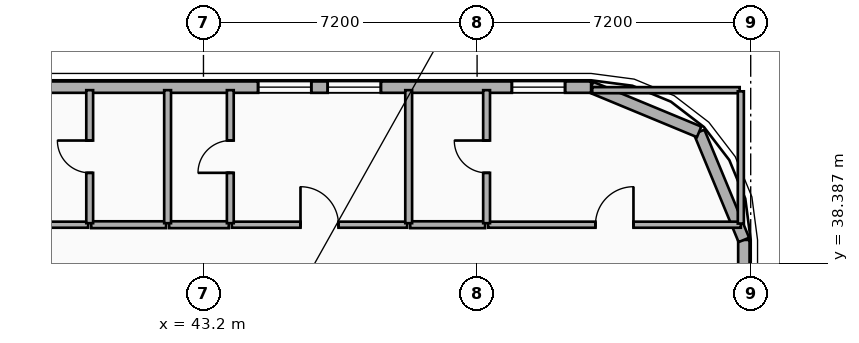
"""IFC4 building model, lengths in metres.
Left out: names, types, materials, properties, quantities, classifications, styles, units other than length and angle.
Written with IfcOpenShell. Run it as: python <this file> out.ifc"""

import sys

from ifc_helpers import new_model, si_unit, direction, frame, frame_2d, origin, place, context, subcontext, project, spatial, rectangle, extrude, element, fill, save


model = new_model("IFC4")
c1 = context("Model", 3, precision=1e-05, world=origin(), true_north=direction((0.0, 1.0)))
c2 = subcontext(c1, "Body", "Model", "MODEL_VIEW")
j1 = project(units=[si_unit("LENGTHUNIT", "METRE"), si_unit("PLANEANGLEUNIT", "RADIAN")], contexts=[c1])
p1 = place(None, origin())
s1 = spatial("IfcSite", under=j1, at=p1, CompositionType="ELEMENT")
p2 = place(p1, origin())
s2 = spatial("IfcBuilding", under=s1, at=p2, CompositionType="ELEMENT")
p3 = place(p2, frame((0.0, 0.0, 97.8)))
s3 = spatial("IfcBuildingStorey", under=s2, at=p3, CompositionType="ELEMENT", Elevation=97.8)
p4 = place(p3, frame((57.42, 39.0, 0.0), z_axis=(0.0, 0.0, 1.0), x_axis=(0.0, -1.0, 0.0)))
e1 = element("IfcWall", 1, at=p4, inside=s3, PredefinedType="SOLIDWALL", context=c2, shape_type="SweptSolid", body=[
    extrude(rectangle(XDim=18.0, YDim=0.3, at=frame_2d((9.0, 0.0))), origin(), (0.0, 0.0, 1.0), 3.24),
])
p5 = place(p4, frame((8.882, 0.0, 0.48)))
e2 = element("IfcOpeningElement", 2, at=p5, cuts=e1, PredefinedType="OPENING", context=c2, shape_type="SweptSolid", body=[
    extrude(rectangle(XDim=1.4, YDim=1.8, at=frame_2d((0.7, 0.9))), frame((0.0, 0.16, 0.0), z_axis=(0.0, -1.0, 0.0), x_axis=(1.0, 0.0, 0.0)), (0.0, 0.0, 1.0), 0.32),
])
p6 = place(p4, frame((3.621, 0.0, 0.48)))
e3 = element("IfcOpeningElement", 3, at=p6, cuts=e1, PredefinedType="OPENING", context=c2, shape_type="SweptSolid", body=[
    extrude(rectangle(XDim=1.4, YDim=1.8, at=frame_2d((0.7, 0.9))), frame((0.0, 0.16, 0.0), z_axis=(0.0, -1.0, 0.0), x_axis=(1.0, 0.0, 0.0)), (0.0, 0.0, 1.0), 0.32),
])
p7 = place(p4, frame((16.28, 0.0, 0.65)))
e4 = element("IfcOpeningElement", 4, at=p7, cuts=e1, PredefinedType="OPENING", context=c2, shape_type="SweptSolid", body=[
    extrude(rectangle(XDim=1.4, YDim=1.8, at=frame_2d((0.7, 0.9))), frame((0.0, 0.16, 0.0), z_axis=(0.0, -1.0, 0.0), x_axis=(1.0, 0.0, 0.0)), (0.0, 0.0, 1.0), 0.32),
])
p8 = place(p3, frame((56.243, 41.843, 0.0), z_axis=(0.0, 0.0, 1.0), x_axis=(0.382636798336, -0.92389884758, 0.0)))
e5 = element("IfcWall", 5, at=p8, inside=s3, PredefinedType="SOLIDWALL", context=c2, shape_type="SweptSolid", body=[
    extrude(rectangle(XDim=3.077, YDim=0.3, at=frame_2d((1.538, 0.0))), origin(), (0.0, 0.0, 1.0), 3.24),
])
p9 = place(p3, frame((53.4, 43.02, 0.0), z_axis=(0.0, 0.0, 1.0), x_axis=(0.923882414032, -0.382676475685, 0.0)))
e6 = element("IfcWall", 6, at=p9, inside=s3, PredefinedType="SOLIDWALL", context=c2, shape_type="SweptSolid", body=[
    extrude(rectangle(XDim=3.077, YDim=0.3, at=frame_2d((1.539, 0.0))), origin(), (0.0, 0.0, 1.0), 3.24),
])
p10 = place(p3, frame((4.2, 43.02, 0.0), z_axis=(0.0, 0.0, 1.0), x_axis=(1.0, 0.0, 0.0)))
e7 = element("IfcWall", 7, at=p10, inside=s3, PredefinedType="SOLIDWALL", context=c2, shape_type="SweptSolid", body=[
    extrude(rectangle(XDim=49.2, YDim=0.3, at=frame_2d((24.6, 0.0))), origin(), (0.0, 0.0, 1.0), 3.24),
])
p11 = place(p10, frame((4.695, 0.0, 0.85)))
e8 = element("IfcOpeningElement", 8, at=p11, cuts=e7, PredefinedType="OPENING", context=c2, shape_type="SweptSolid", body=[
    extrude(rectangle(XDim=1.4, YDim=1.8, at=frame_2d((0.7, 0.9))), frame((0.0, 0.16, 0.0), z_axis=(0.0, -1.0, 0.0), x_axis=(1.0, 0.0, 0.0)), (0.0, 0.0, 1.0), 0.32),
])
p12 = place(p10, frame((7.631, 0.0, 0.85)))
e9 = element("IfcOpeningElement", 9, at=p12, cuts=e7, PredefinedType="OPENING", context=c2, shape_type="SweptSolid", body=[
    extrude(rectangle(XDim=1.4, YDim=1.8, at=frame_2d((0.7, 0.9))), frame((0.0, 0.16, 0.0), z_axis=(0.0, -1.0, 0.0), x_axis=(1.0, 0.0, 0.0)), (0.0, 0.0, 1.0), 0.32),
])
p13 = place(p10, frame((15.417, 0.0, 0.85)))
e10 = element("IfcOpeningElement", 10, at=p13, cuts=e7, PredefinedType="OPENING", context=c2, shape_type="SweptSolid", body=[
    extrude(rectangle(XDim=1.4, YDim=1.8, at=frame_2d((0.7, 0.9))), frame((0.0, 0.16, 0.0), z_axis=(0.0, -1.0, 0.0), x_axis=(1.0, 0.0, 0.0)), (0.0, 0.0, 1.0), 0.32),
])
p14 = place(p10, frame((17.369, 0.0, 0.85)))
e11 = element("IfcOpeningElement", 11, at=p14, cuts=e7, PredefinedType="OPENING", context=c2, shape_type="SweptSolid", body=[
    extrude(rectangle(XDim=1.4, YDim=1.8, at=frame_2d((0.7, 0.9))), frame((0.0, 0.16, 0.0), z_axis=(0.0, -1.0, 0.0), x_axis=(1.0, 0.0, 0.0)), (0.0, 0.0, 1.0), 0.32),
])
p15 = place(p10, frame((22.921, 0.0, 0.85)))
e12 = element("IfcOpeningElement", 12, at=p15, cuts=e7, PredefinedType="OPENING", context=c2, shape_type="SweptSolid", body=[
    extrude(rectangle(XDim=1.4, YDim=1.8, at=frame_2d((0.7, 0.9))), frame((0.0, 0.16, 0.0), z_axis=(0.0, -1.0, 0.0), x_axis=(1.0, 0.0, 0.0)), (0.0, 0.0, 1.0), 0.32),
])
p16 = place(p10, frame((25.31, 0.0, 0.85)))
e13 = element("IfcOpeningElement", 13, at=p16, cuts=e7, PredefinedType="OPENING", context=c2, shape_type="SweptSolid", body=[
    extrude(rectangle(XDim=1.4, YDim=1.8, at=frame_2d((0.7, 0.9))), frame((0.0, 0.16, 0.0), z_axis=(0.0, -1.0, 0.0), x_axis=(1.0, 0.0, 0.0)), (0.0, 0.0, 1.0), 0.32),
])
p17 = place(p10, frame((29.835, 0.0, 0.85)))
e14 = element("IfcOpeningElement", 14, at=p17, cuts=e7, PredefinedType="OPENING", context=c2, shape_type="SweptSolid", body=[
    extrude(rectangle(XDim=1.4, YDim=1.8, at=frame_2d((0.7, 0.9))), frame((0.0, 0.16, 0.0), z_axis=(0.0, -1.0, 0.0), x_axis=(1.0, 0.0, 0.0)), (0.0, 0.0, 1.0), 0.32),
])
p18 = place(p10, frame((32.771, 0.0, 0.85)))
e15 = element("IfcOpeningElement", 15, at=p18, cuts=e7, PredefinedType="OPENING", context=c2, shape_type="SweptSolid", body=[
    extrude(rectangle(XDim=1.4, YDim=1.8, at=frame_2d((0.7, 0.9))), frame((0.0, 0.16, 0.0), z_axis=(0.0, -1.0, 0.0), x_axis=(1.0, 0.0, 0.0)), (0.0, 0.0, 1.0), 0.32),
])
p19 = place(p10, frame((40.437, 0.0, 0.85)))
e16 = element("IfcOpeningElement", 16, at=p19, cuts=e7, PredefinedType="OPENING", context=c2, shape_type="SweptSolid", body=[
    extrude(rectangle(XDim=1.4, YDim=1.8, at=frame_2d((0.7, 0.9))), frame((0.0, 0.16, 0.0), z_axis=(0.0, -1.0, 0.0), x_axis=(1.0, 0.0, 0.0)), (0.0, 0.0, 1.0), 0.32),
])
p20 = place(p10, frame((42.269, 0.0, 0.85)))
e17 = element("IfcOpeningElement", 17, at=p20, cuts=e7, PredefinedType="OPENING", context=c2, shape_type="SweptSolid", body=[
    extrude(rectangle(XDim=1.4, YDim=1.8, at=frame_2d((0.7, 0.9))), frame((0.0, 0.16, 0.0), z_axis=(0.0, -1.0, 0.0), x_axis=(1.0, 0.0, 0.0)), (0.0, 0.0, 1.0), 0.32),
])
p21 = place(p10, frame((47.115, 0.0, 0.85)))
e18 = element("IfcOpeningElement", 18, at=p21, cuts=e7, PredefinedType="OPENING", context=c2, shape_type="SweptSolid", body=[
    extrude(rectangle(XDim=1.4, YDim=1.8, at=frame_2d((0.7, 0.9))), frame((0.0, 0.16, 0.0), z_axis=(0.0, -1.0, 0.0), x_axis=(1.0, 0.0, 0.0)), (0.0, 0.0, 1.0), 0.32),
])
p22 = place(p3, frame((32.24, 39.4, 0.0), z_axis=(0.0, 0.0, 1.0), x_axis=(1.0, 0.0, 0.0)))
e19 = element("IfcWall", 19, at=p22, inside=s3, PredefinedType="PARTITIONING", context=c2, shape_type="SweptSolid", body=[
    extrude(rectangle(XDim=7.926, YDim=0.16, at=frame_2d((3.963, 0.0))), origin(), (0.0, 0.0, 1.0), 3.24),
])
p23 = place(p22, frame((3.463, 0.0, 0.0)))
e20 = element("IfcOpeningElement", 20, at=p23, cuts=e19, PredefinedType="OPENING", context=c2, shape_type="SweptSolid", body=[
    extrude(rectangle(XDim=1.0, YDim=2.15, at=frame_2d((0.5, 1.075))), frame((0.0, 0.09, 0.0), z_axis=(0.0, -1.0, 0.0), x_axis=(1.0, 0.0, 0.0)), (0.0, 0.0, 1.0), 0.18),
])
p24 = place(p3, frame((40.246, 39.4, 0.0), z_axis=(0.0, 0.0, 1.0), x_axis=(1.0, 0.0, 0.0)))
e21 = element("IfcWall", 21, at=p24, inside=s3, PredefinedType="PLUMBINGWALL", context=c2, shape_type="SweptSolid", body=[
    extrude(rectangle(XDim=1.97, YDim=0.18, at=frame_2d((0.985, 0.0))), origin(), (0.0, 0.0, 1.0), 3.24),
])
p25 = place(p3, frame((43.946, 39.4, 0.0), z_axis=(0.0, 0.0, 1.0), x_axis=(1.0, 0.0, 0.0)))
e22 = element("IfcWall", 22, at=p25, inside=s3, PredefinedType="PARTITIONING", context=c2, shape_type="SweptSolid", body=[
    extrude(rectangle(XDim=4.614, YDim=0.16, at=frame_2d((2.307, 0.0))), origin(), (0.0, 0.0, 1.0), 3.24),
])
p26 = place(p25, frame((1.807, 0.0, 0.0)))
e23 = element("IfcOpeningElement", 23, at=p26, cuts=e22, PredefinedType="OPENING", context=c2, shape_type="SweptSolid", body=[
    extrude(rectangle(XDim=1.0, YDim=2.15, at=frame_2d((0.5, 1.075))), frame((0.0, 0.09, 0.0), z_axis=(0.0, -1.0, 0.0), x_axis=(1.0, 0.0, 0.0)), (0.0, 0.0, 1.0), 0.18),
])
p27 = place(p3, frame((42.296, 39.4, 0.0), z_axis=(0.0, 0.0, 1.0), x_axis=(1.0, 0.0, 0.0)))
e24 = element("IfcWall", 24, at=p27, inside=s3, PredefinedType="PLUMBINGWALL", context=c2, shape_type="SweptSolid", body=[
    extrude(rectangle(XDim=1.57, YDim=0.18, at=frame_2d((0.785, 0.0))), origin(), (0.0, 0.0, 1.0), 3.24),
])
p28 = place(p3, frame((50.69, 39.4, 0.0), z_axis=(0.0, 0.0, 1.0), x_axis=(1.0, 0.0, 0.0)))
e25 = element("IfcWall", 25, at=p28, inside=s3, PredefinedType="PARTITIONING", context=c2, shape_type="SweptSolid", body=[
    extrude(rectangle(XDim=6.65, YDim=0.16, at=frame_2d((3.325, 0.0))), origin(), (0.0, 0.0, 1.0), 3.24),
])
p29 = place(p28, frame((2.825, 0.0, 0.0)))
e26 = element("IfcOpeningElement", 26, at=p29, cuts=e25, PredefinedType="OPENING", context=c2, shape_type="SweptSolid", body=[
    extrude(rectangle(XDim=1.0, YDim=2.15, at=frame_2d((0.5, 1.075))), frame((0.0, 0.09, 0.0), z_axis=(0.0, -1.0, 0.0), x_axis=(1.0, 0.0, 0.0)), (0.0, 0.0, 1.0), 0.18),
])
p30 = place(p3, frame((48.64, 39.4, 0.0), z_axis=(0.0, 0.0, 1.0), x_axis=(1.0, 0.0, 0.0)))
e27 = element("IfcWall", 27, at=p30, inside=s3, PredefinedType="PLUMBINGWALL", context=c2, shape_type="SweptSolid", body=[
    extrude(rectangle(XDim=1.97, YDim=0.18, at=frame_2d((0.985, 0.0))), origin(), (0.0, 0.0, 1.0), 3.24),
])
p31 = place(p3, frame((40.206, 39.44, 0.0), z_axis=(0.0, 0.0, 1.0), x_axis=(0.0, 1.0, 0.0)))
e28 = element("IfcWall", 28, at=p31, inside=s3, PredefinedType="PLUMBINGWALL", context=c2, shape_type="SweptSolid", body=[
    extrude(rectangle(XDim=3.5, YDim=0.18, at=frame_2d((1.75, 0.0))), origin(), (0.0, 0.0, 1.0), 3.24),
])
p32 = place(p31, frame((1.325, 0.0, 0.0)))
e29 = element("IfcOpeningElement", 29, at=p32, cuts=e28, PredefinedType="OPENING", context=c2, shape_type="SweptSolid", body=[
    extrude(rectangle(XDim=0.85, YDim=2.1, at=frame_2d((0.425, 1.05))), frame((0.0, 0.1, 0.0), z_axis=(0.0, -1.0, 0.0), x_axis=(1.0, 0.0, 0.0)), (0.0, 0.0, 1.0), 0.2),
])
p33 = place(p3, frame((42.256, 39.44, 0.0), z_axis=(0.0, 0.0, 1.0), x_axis=(0.0, 1.0, 0.0)))
e30 = element("IfcWall", 30, at=p33, inside=s3, PredefinedType="PLUMBINGWALL", context=c2, shape_type="SweptSolid", body=[
    extrude(rectangle(XDim=3.5, YDim=0.18, at=frame_2d((1.75, 0.0))), origin(), (0.0, 0.0, 1.0), 3.24),
])
p34 = place(p3, frame((43.906, 39.44, 0.0), z_axis=(0.0, 0.0, 1.0), x_axis=(0.0, 1.0, 0.0)))
e31 = element("IfcWall", 31, at=p34, inside=s3, PredefinedType="PLUMBINGWALL", context=c2, shape_type="SweptSolid", body=[
    extrude(rectangle(XDim=3.5, YDim=0.18, at=frame_2d((1.75, 0.0))), origin(), (0.0, 0.0, 1.0), 3.24),
])
p35 = place(p34, frame((1.325, 0.0, 0.0)))
e32 = element("IfcOpeningElement", 32, at=p35, cuts=e31, PredefinedType="OPENING", context=c2, shape_type="SweptSolid", body=[
    extrude(rectangle(XDim=0.85, YDim=2.1, at=frame_2d((0.425, 1.05))), frame((0.0, 0.1, 0.0), z_axis=(0.0, -1.0, 0.0), x_axis=(1.0, 0.0, 0.0)), (0.0, 0.0, 1.0), 0.2),
])
p36 = place(p3, frame((48.6, 39.44, 0.0), z_axis=(0.0, 0.0, 1.0), x_axis=(0.0, 1.0, 0.0)))
e33 = element("IfcWall", 33, at=p36, inside=s3, PredefinedType="PLUMBINGWALL", context=c2, shape_type="SweptSolid", body=[
    extrude(rectangle(XDim=3.5, YDim=0.18, at=frame_2d((1.75, 0.0))), origin(), (0.0, 0.0, 1.0), 3.24),
])
p37 = place(p3, frame((50.65, 39.44, 0.0), z_axis=(0.0, 0.0, 1.0), x_axis=(0.0, 1.0, 0.0)))
e34 = element("IfcWall", 34, at=p37, inside=s3, PredefinedType="PLUMBINGWALL", context=c2, shape_type="SweptSolid", body=[
    extrude(rectangle(XDim=3.5, YDim=0.18, at=frame_2d((1.75, 0.0))), origin(), (0.0, 0.0, 1.0), 3.24),
])
p38 = place(p37, frame((1.325, 0.0, 0.0)))
e35 = element("IfcOpeningElement", 35, at=p38, cuts=e34, PredefinedType="OPENING", context=c2, shape_type="SweptSolid", body=[
    extrude(rectangle(XDim=0.85, YDim=2.1, at=frame_2d((0.425, 1.05))), frame((0.0, 0.1, 0.0), z_axis=(0.0, -1.0, 0.0), x_axis=(1.0, 0.0, 0.0)), (0.0, 0.0, 1.0), 0.2),
])
p39 = place(p3, frame((53.43, 42.94, 0.0), z_axis=(0.0, 0.0, 1.0), x_axis=(1.0, 0.0, 0.0)))
e36 = element("IfcWall", 36, at=p39, inside=s3, PredefinedType="PARTITIONING", context=c2, shape_type="SweptSolid", body=[
    extrude(rectangle(XDim=3.88, YDim=0.16, at=frame_2d((1.94, 0.0))), origin(), (0.0, 0.0, 1.0), 3.24),
])
p40 = place(p3, frame((57.34, 39.43, 0.0), z_axis=(0.0, 0.0, 1.0), x_axis=(0.0, 1.0, 0.0)))
e37 = element("IfcWall", 37, at=p40, inside=s3, PredefinedType="PARTITIONING", context=c2, shape_type="SweptSolid", body=[
    extrude(rectangle(XDim=3.48, YDim=0.16, at=frame_2d((1.74, 0.0))), origin(), (0.0, 0.0, 1.0), 3.24),
])
p41 = place(p19, origin())
e38 = element("IfcWindow", 38, at=p41, inside=s3, PartitioningType="SINGLE_PANEL", PredefinedType="WINDOW", context=c2, shape_type="SweptSolid", body=[
    extrude(rectangle(XDim=1.4, YDim=1.8, at=frame_2d((0.7, 0.9))), frame((0.0, 0.03, 0.0), z_axis=(0.0, -1.0, 0.0), x_axis=(1.0, 0.0, 0.0)), (0.0, 0.0, 1.0), 0.06),
])
fill(e16, e38)
p42 = place(p20, origin())
e39 = element("IfcWindow", 39, at=p42, inside=s3, PartitioningType="SINGLE_PANEL", PredefinedType="WINDOW", context=c2, shape_type="SweptSolid", body=[
    extrude(rectangle(XDim=1.4, YDim=1.8, at=frame_2d((0.7, 0.9))), frame((0.0, 0.03, 0.0), z_axis=(0.0, -1.0, 0.0), x_axis=(1.0, 0.0, 0.0)), (0.0, 0.0, 1.0), 0.06),
])
fill(e17, e39)
p43 = place(p21, origin())
e40 = element("IfcWindow", 40, at=p43, inside=s3, PartitioningType="SINGLE_PANEL", PredefinedType="WINDOW", context=c2, shape_type="SweptSolid", body=[
    extrude(rectangle(XDim=1.4, YDim=1.8, at=frame_2d((0.7, 0.9))), frame((0.0, 0.03, 0.0), z_axis=(0.0, -1.0, 0.0), x_axis=(1.0, 0.0, 0.0)), (0.0, 0.0, 1.0), 0.06),
])
fill(e18, e40)
p44 = place(p26, origin())
e41 = element("IfcDoor", 41, at=p44, inside=s3, OperationType="SINGLE_SWING_LEFT", PredefinedType="DOOR", context=c2, shape_type="SweptSolid", body=[
    extrude(rectangle(XDim=1.0, YDim=2.15, at=frame_2d((0.5, 1.075))), frame((0.0, 0.025, 0.0), z_axis=(0.0, -1.0, 0.0), x_axis=(1.0, 0.0, 0.0)), (0.0, 0.0, 1.0), 0.05),
])
fill(e23, e41)
p45 = place(p29, origin())
e42 = element("IfcDoor", 42, at=p45, inside=s3, OperationType="SINGLE_SWING_RIGHT", PredefinedType="DOOR", context=c2, shape_type="SweptSolid", body=[
    extrude(rectangle(XDim=1.0, YDim=2.15, at=frame_2d((0.5, 1.075))), frame((0.0, 0.025, 0.0), z_axis=(0.0, -1.0, 0.0), x_axis=(1.0, 0.0, 0.0)), (0.0, 0.0, 1.0), 0.05),
])
fill(e26, e42)
p46 = place(p32, origin())
e43 = element("IfcDoor", 43, at=p46, inside=s3, OperationType="SINGLE_SWING_RIGHT", PredefinedType="DOOR", context=c2, shape_type="SweptSolid", body=[
    extrude(rectangle(XDim=0.85, YDim=2.1, at=frame_2d((0.425, 1.05))), frame((0.0, 0.025, 0.0), z_axis=(0.0, -1.0, 0.0), x_axis=(1.0, 0.0, 0.0)), (0.0, 0.0, 1.0), 0.05),
])
fill(e29, e43)
p47 = place(p35, origin())
e44 = element("IfcDoor", 44, at=p47, inside=s3, OperationType="SINGLE_SWING_LEFT", PredefinedType="DOOR", context=c2, shape_type="SweptSolid", body=[
    extrude(rectangle(XDim=0.85, YDim=2.1, at=frame_2d((0.425, 1.05))), frame((0.0, 0.025, 0.0), z_axis=(0.0, -1.0, 0.0), x_axis=(1.0, 0.0, 0.0)), (0.0, 0.0, 1.0), 0.05),
])
fill(e32, e44)
p48 = place(p38, origin())
e45 = element("IfcDoor", 45, at=p48, inside=s3, OperationType="SINGLE_SWING_RIGHT", PredefinedType="DOOR", context=c2, shape_type="SweptSolid", body=[
    extrude(rectangle(XDim=0.85, YDim=2.1, at=frame_2d((0.425, 1.05))), frame((0.0, 0.025, 0.0), z_axis=(0.0, -1.0, 0.0), x_axis=(1.0, 0.0, 0.0)), (0.0, 0.0, 1.0), 0.05),
])
fill(e35, e45)
save(model, sys.argv[1])
